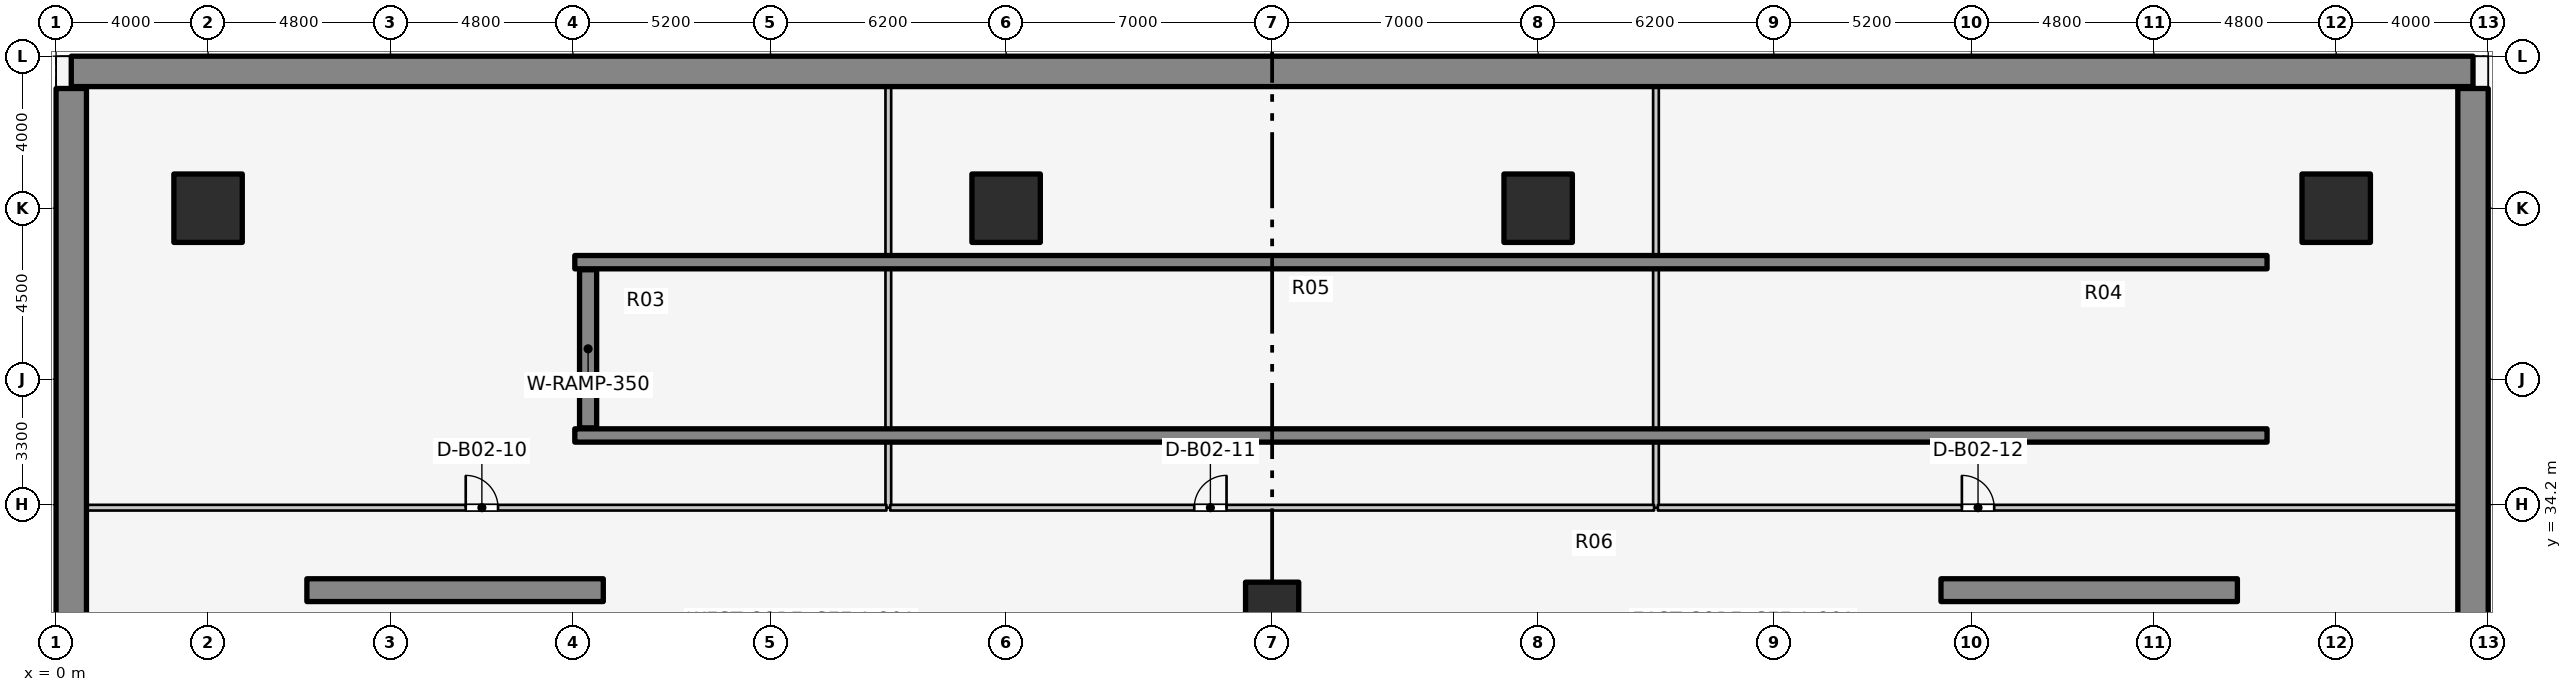
"""IFC4 building model, lengths in metres.
Left out: names, types, materials, properties, quantities, classifications, styles, units other than length and angle.
Written with IfcOpenShell. Run it as: python <this file> out.ifc"""

import sys

from ifc_helpers import new_model, si_unit, direction, frame, frame_2d, origin, origin_2d, place, context, subcontext, project, spatial, rectangle, extrude, element, fill, save


model = new_model("IFC4")
c1 = context("Model", 3, precision=1e-05, world=origin(), true_north=direction((0.0, 1.0)))
c2 = subcontext(c1, "Body", "Model", "MODEL_VIEW")
j1 = project(units=[si_unit("LENGTHUNIT", "METRE"), si_unit("PLANEANGLEUNIT", "RADIAN")], contexts=[c1])
p1 = place(None, origin())
s1 = spatial("IfcSite", under=j1, at=p1, CompositionType="ELEMENT")
p2 = place(p1, origin())
s2 = spatial("IfcBuilding", under=s1, at=p2, CompositionType="ELEMENT")
p3 = place(p2, frame((0.0, 0.0, -10.8)))
s3 = spatial("IfcBuildingStorey", under=s2, at=p3, CompositionType="ELEMENT", Elevation=-10.8)
p4 = place(p3, frame((63.6, 15.6, 0.0), z_axis=(0.0, 0.0, 1.0), x_axis=(0.0, 1.0, 0.0)))
e1 = element("IfcWall", 1, at=p4, inside=s3, PredefinedType="USERDEFINED", context=c2, shape_type="SweptSolid", body=[
    extrude(rectangle(XDim=29.55, YDim=0.8, at=frame_2d((14.775, 0.0))), origin(), (0.0, 0.0, 1.0), 5.4),
])
p5 = place(p3, frame((63.6, 45.6, 0.0), z_axis=(0.0, 0.0, 1.0), x_axis=(-1.0, 0.0, 0.0)))
e2 = element("IfcWall", 2, at=p5, inside=s3, PredefinedType="USERDEFINED", context=c2, shape_type="SweptSolid", body=[
    extrude(rectangle(XDim=63.2, YDim=0.8, at=frame_2d((31.6, 0.0))), origin(), (0.0, 0.0, 1.0), 5.4),
])
p6 = place(p3, frame((0.4, 45.15, 0.0), z_axis=(0.0, 0.0, 1.0), x_axis=(0.0, -1.0, 0.0)))
e3 = element("IfcWall", 3, at=p6, inside=s3, PredefinedType="USERDEFINED", context=c2, shape_type="SweptSolid", body=[
    extrude(rectangle(XDim=29.55, YDim=0.8, at=frame_2d((14.775, 0.0))), origin(), (0.0, 0.0, 1.0), 5.4),
])
for number, where, z_axis, x_axis in (
    (4, (6.6, 31.95, 0.0), (0.0, 0.0, 1.0), (1.0, 0.0, 0.0)),
    (5, (49.6, 31.95, 0.0), (0.0, 0.0, 1.0), (1.0, 0.0, 0.0)),
):
    element("IfcWall", number, at=place(p3, frame(where, z_axis=z_axis, x_axis=x_axis)), inside=s3, PredefinedType="SOLIDWALL", context=c2, shape_type="SweptSolid", body=[
        extrude(rectangle(XDim=7.8, YDim=0.6, at=frame_2d((3.9, 0.0))), origin(), (0.0, 0.0, 1.0), 5.4),
    ])
p7 = place(p3, frame((14.0, 36.22, 0.0), z_axis=(0.0, 0.0, 1.0), x_axis=(0.0, 1.0, 0.0)))
e6 = element("IfcWall", 6, at=p7, inside=s3, PredefinedType="SOLIDWALL", context=c2, shape_type="SweptSolid", body=[
    extrude(rectangle(XDim=4.16, YDim=0.45, at=frame_2d((2.08, 0.0))), origin(), (0.0, 0.0, 1.0), 5.4),
])
for number, where, z_axis, x_axis in (
    (7, (13.65, 36.02, 0.0), (0.0, 0.0, 1.0), (1.0, 0.0, 0.0)),
    (8, (13.65, 40.58, 0.0), (0.0, 0.0, 1.0), (1.0, 0.0, 0.0)),
):
    element("IfcWall", number, at=place(p3, frame(where, z_axis=z_axis, x_axis=x_axis)), inside=s3, PredefinedType="SOLIDWALL", context=c2, shape_type="SweptSolid", body=[
        extrude(rectangle(XDim=44.53, YDim=0.35, at=frame_2d((22.265, 0.0))), origin(), (0.0, 0.0, 1.0), 5.4),
    ])
for number, where, z_axis, x_axis in (
    (9, (60.0, 42.0, 0.0), (0.0, 0.0, 1.0), (1.0, 0.0, 0.0)),
    (10, (39.0, 42.0, 0.0), (0.0, 0.0, 1.0), (1.0, 0.0, 0.0)),
    (11, (25.0, 42.0, 0.0), (0.0, 0.0, 1.0), (1.0, 0.0, 0.0)),
    (12, (4.0, 42.0, 0.0), (0.0, 0.0, 1.0), (1.0, 0.0, 0.0)),
):
    element("IfcColumn", number, at=place(p3, frame(where, z_axis=z_axis, x_axis=x_axis)), inside=s3, PredefinedType="COLUMN", context=c2, shape_type="SweptSolid", body=[
        extrude(rectangle(XDim=1.8, YDim=1.8, at=origin_2d()), origin(), (0.0, 0.0, 1.0), 5.4),
    ])
p8 = place(p3, frame((32.0, 31.46, 0.0), z_axis=(0.0, 0.0, 1.0), x_axis=(1.0, 0.0, 0.0)))
e13 = element("IfcColumn", 13, at=p8, inside=s3, PredefinedType="COLUMN", context=c2, shape_type="SweptSolid", body=[
    extrude(rectangle(XDim=1.4, YDim=1.4, at=origin_2d()), origin(), (0.0, 0.0, 1.0), 5.4),
])
for number, where, z_axis, x_axis in (
    (14, (21.9, 34.12, 0.0), (0.0, 0.0, 1.0), (0.0, 1.0, 0.0)),
    (15, (42.1, 34.12, 0.0), (0.0, 0.0, 1.0), (0.0, 1.0, 0.0)),
):
    element("IfcWall", number, at=place(p3, frame(where, z_axis=z_axis, x_axis=x_axis)), inside=s3, PredefinedType="PARTITIONING", context=c2, shape_type="SweptSolid", body=[
        extrude(rectangle(XDim=11.1, YDim=0.15, at=frame_2d((5.55, 0.0))), origin(), (0.0, 0.0, 1.0), 4.1),
    ])
p9 = place(p3, frame((0.78, 34.12, 0.0), z_axis=(0.0, 0.0, 1.0), x_axis=(1.0, 0.0, 0.0)))
e16 = element("IfcWall", 16, at=p9, inside=s3, PredefinedType="PARTITIONING", context=c2, shape_type="SweptSolid", body=[
    extrude(rectangle(XDim=21.07, YDim=0.15, at=frame_2d((10.535, 0.0))), origin(), (0.0, 0.0, 1.0), 4.1),
])
p10 = place(p9, frame((10.0, 0.0, 0.0)))
e17 = element("IfcOpeningElement", 17, at=p10, cuts=e16, PredefinedType="OPENING", context=c2, shape_type="SweptSolid", body=[
    extrude(rectangle(XDim=0.85, YDim=2.05, at=frame_2d((0.425, 1.025))), frame((0.0, 0.085, 0.0), z_axis=(0.0, -1.0, 0.0), x_axis=(1.0, 0.0, 0.0)), (0.0, 0.0, 1.0), 0.17),
])
p11 = place(p3, frame((21.95, 34.12, 0.0), z_axis=(0.0, 0.0, 1.0), x_axis=(1.0, 0.0, 0.0)))
e18 = element("IfcWall", 18, at=p11, inside=s3, PredefinedType="PARTITIONING", context=c2, shape_type="SweptSolid", body=[
    extrude(rectangle(XDim=20.1, YDim=0.15, at=frame_2d((10.05, 0.0))), origin(), (0.0, 0.0, 1.0), 4.1),
])
p12 = place(p11, frame((8.0, 0.0, 0.0)))
e19 = element("IfcOpeningElement", 19, at=p12, cuts=e18, PredefinedType="OPENING", context=c2, shape_type="SweptSolid", body=[
    extrude(rectangle(XDim=0.85, YDim=2.05, at=frame_2d((0.425, 1.025))), frame((0.0, 0.085, 0.0), z_axis=(0.0, -1.0, 0.0), x_axis=(1.0, 0.0, 0.0)), (0.0, 0.0, 1.0), 0.17),
])
p13 = place(p3, frame((42.15, 34.12, 0.0), z_axis=(0.0, 0.0, 1.0), x_axis=(1.0, 0.0, 0.0)))
e20 = element("IfcWall", 20, at=p13, inside=s3, PredefinedType="PARTITIONING", context=c2, shape_type="SweptSolid", body=[
    extrude(rectangle(XDim=21.07, YDim=0.15, at=frame_2d((10.535, 0.0))), origin(), (0.0, 0.0, 1.0), 4.1),
])
p14 = place(p13, frame((8.0, 0.0, 0.0)))
e21 = element("IfcOpeningElement", 21, at=p14, cuts=e20, PredefinedType="OPENING", context=c2, shape_type="SweptSolid", body=[
    extrude(rectangle(XDim=0.85, YDim=2.05, at=frame_2d((0.425, 1.025))), frame((0.0, 0.085, 0.0), z_axis=(0.0, -1.0, 0.0), x_axis=(1.0, 0.0, 0.0)), (0.0, 0.0, 1.0), 0.17),
])
p15 = place(p10, origin())
e22 = element("IfcDoor", 22, at=p15, inside=s3, OperationType="SINGLE_SWING_LEFT", PredefinedType="DOOR", context=c2, shape_type="SweptSolid", body=[
    extrude(rectangle(XDim=0.85, YDim=2.05, at=frame_2d((0.425, 1.025))), frame((0.0, 0.025, 0.0), z_axis=(0.0, -1.0, 0.0), x_axis=(1.0, 0.0, 0.0)), (0.0, 0.0, 1.0), 0.05),
])
fill(e17, e22)
p16 = place(p12, origin())
e23 = element("IfcDoor", 23, at=p16, inside=s3, OperationType="SINGLE_SWING_RIGHT", PredefinedType="DOOR", context=c2, shape_type="SweptSolid", body=[
    extrude(rectangle(XDim=0.85, YDim=2.05, at=frame_2d((0.425, 1.025))), frame((0.0, 0.025, 0.0), z_axis=(0.0, -1.0, 0.0), x_axis=(1.0, 0.0, 0.0)), (0.0, 0.0, 1.0), 0.05),
])
fill(e19, e23)
p17 = place(p14, origin())
e24 = element("IfcDoor", 24, at=p17, inside=s3, OperationType="SINGLE_SWING_LEFT", PredefinedType="DOOR", context=c2, shape_type="SweptSolid", body=[
    extrude(rectangle(XDim=0.85, YDim=2.05, at=frame_2d((0.425, 1.025))), frame((0.0, 0.025, 0.0), z_axis=(0.0, -1.0, 0.0), x_axis=(1.0, 0.0, 0.0)), (0.0, 0.0, 1.0), 0.05),
])
fill(e21, e24)
save(model, sys.argv[1])
